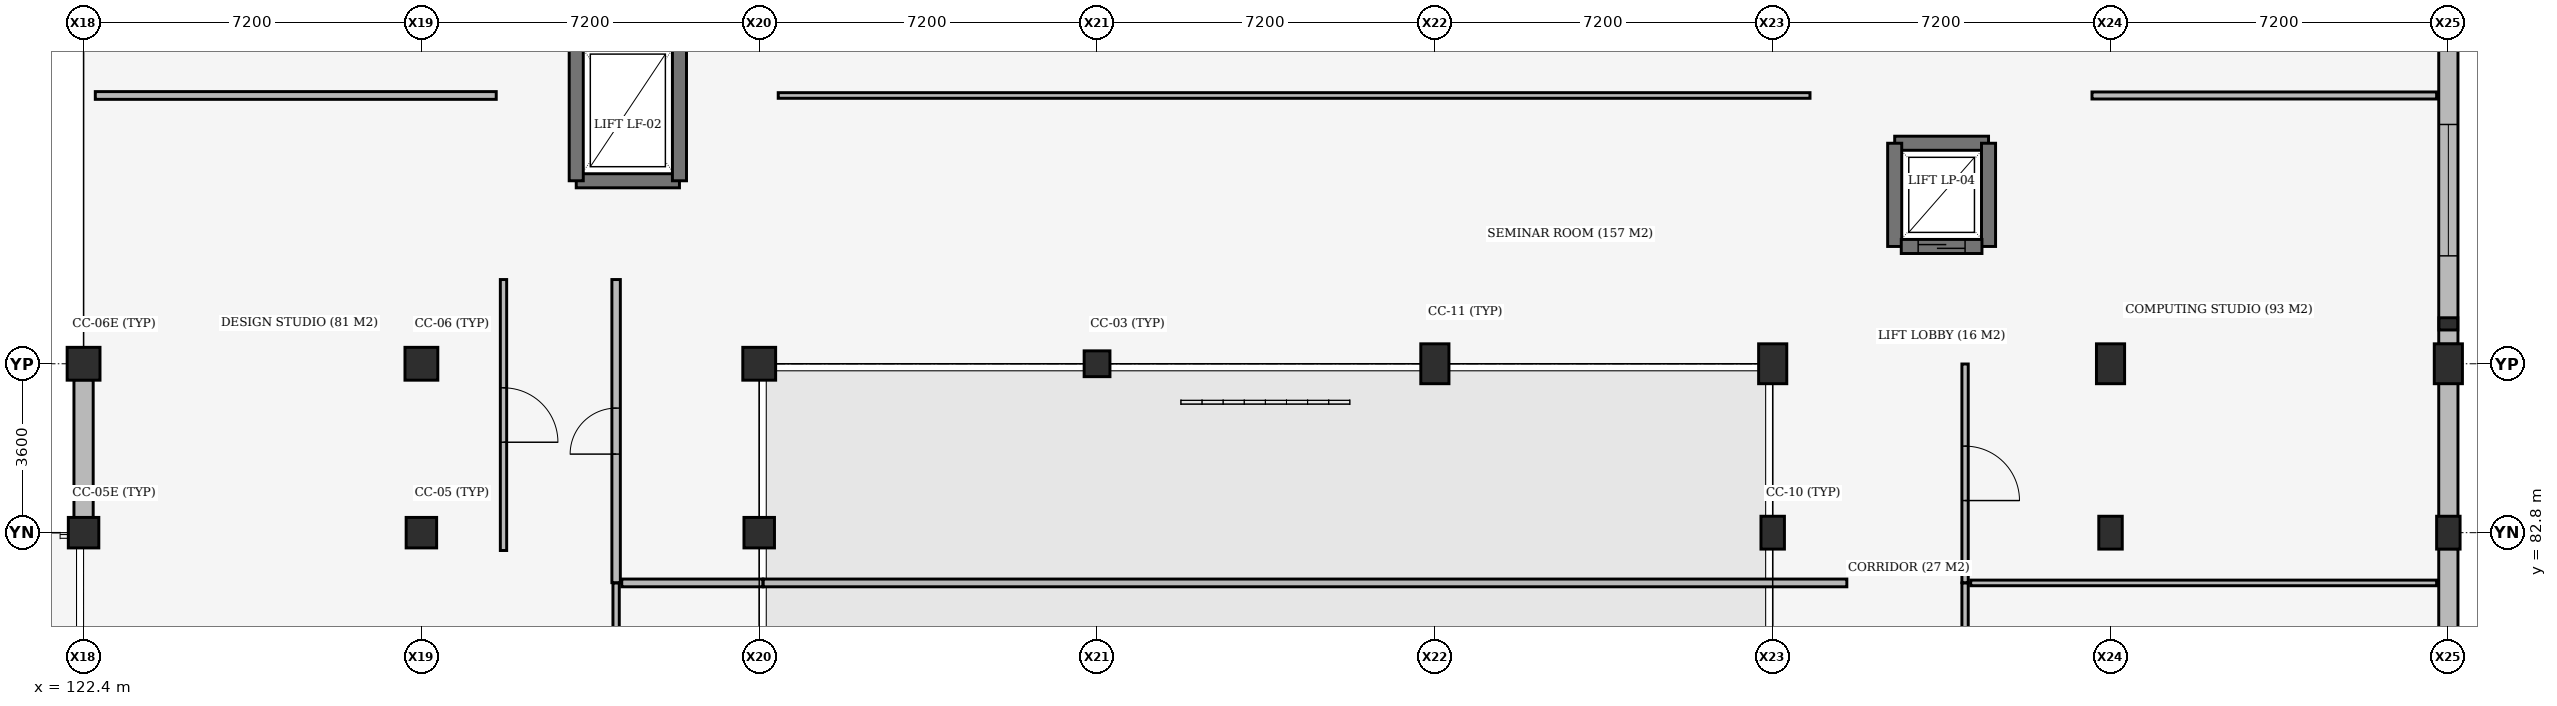
"""IFC4 building model, lengths in metres.
Left out: names, types, materials, properties, quantities, classifications, styles, units other than length and angle.
Written with IfcOpenShell. Run it as: python <this file> out.ifc"""

import sys

from ifc_helpers import new_model, si_unit, direction, frame, frame_2d, origin, origin_2d, place, context, subcontext, project, spatial, rectangle, extrude, element, fill, save


model = new_model("IFC4")
c1 = context("Model", 3, precision=1e-05, world=origin(), true_north=direction((0.0, 1.0)))
c2 = subcontext(c1, "Body", "Model", "MODEL_VIEW")
j1 = project(units=[si_unit("LENGTHUNIT", "METRE"), si_unit("PLANEANGLEUNIT", "RADIAN")], contexts=[c1])
p1 = place(None, origin())
s1 = spatial("IfcSite", under=j1, at=p1, CompositionType="ELEMENT")
p2 = place(p1, origin())
s2 = spatial("IfcBuilding", under=s1, at=p2, CompositionType="ELEMENT")
p3 = place(p2, origin())
s3 = spatial("IfcBuildingStorey", under=s2, at=p3, CompositionType="ELEMENT", Elevation=0.0)
p4 = place(p3, frame((122.4, 82.8, 0.0), z_axis=(0.0, 0.0, 1.0), x_axis=(1.0, 0.0, 0.0)))
e1 = element("IfcColumn", 1, at=p4, inside=s3, PredefinedType="COLUMN", context=c2, shape_type="SweptSolid", body=[
    extrude(rectangle(XDim=0.65, YDim=0.65, at=origin_2d()), origin(), (0.0, 0.0, 1.0), 5.1),
])
p5 = place(p3, frame((122.4, 86.4, 0.0), z_axis=(0.0, 0.0, 1.0), x_axis=(1.0, 0.0, 0.0)))
e2 = element("IfcColumn", 2, at=p5, inside=s3, PredefinedType="COLUMN", context=c2, shape_type="SweptSolid", body=[
    extrude(rectangle(XDim=0.7, YDim=0.7, at=origin_2d()), origin(), (0.0, 0.0, 1.0), 5.1),
])
p6 = place(p3, frame((129.6, 82.8, 0.0), z_axis=(0.0, 0.0, 1.0), x_axis=(1.0, 0.0, 0.0)))
e3 = element("IfcColumn", 3, at=p6, inside=s3, PredefinedType="COLUMN", context=c2, shape_type="SweptSolid", body=[
    extrude(rectangle(XDim=0.65, YDim=0.65, at=origin_2d()), origin(), (0.0, 0.0, 1.0), 5.1),
])
p7 = place(p3, frame((129.6, 86.4, 0.0), z_axis=(0.0, 0.0, 1.0), x_axis=(1.0, 0.0, 0.0)))
e4 = element("IfcColumn", 4, at=p7, inside=s3, PredefinedType="COLUMN", context=c2, shape_type="SweptSolid", body=[
    extrude(rectangle(XDim=0.7, YDim=0.7, at=origin_2d()), origin(), (0.0, 0.0, 1.0), 5.1),
])
p8 = place(p3, frame((136.8, 82.8, 0.0), z_axis=(0.0, 0.0, 1.0), x_axis=(1.0, 0.0, 0.0)))
e5 = element("IfcColumn", 5, at=p8, inside=s3, PredefinedType="COLUMN", context=c2, shape_type="SweptSolid", body=[
    extrude(rectangle(XDim=0.65, YDim=0.65, at=origin_2d()), origin(), (0.0, 0.0, 1.0), 5.1),
])
p9 = place(p3, frame((136.8, 86.4, 0.0), z_axis=(0.0, 0.0, 1.0), x_axis=(1.0, 0.0, 0.0)))
e6 = element("IfcColumn", 6, at=p9, inside=s3, PredefinedType="COLUMN", context=c2, shape_type="SweptSolid", body=[
    extrude(rectangle(XDim=0.7, YDim=0.7, at=origin_2d()), origin(), (0.0, 0.0, 1.0), 5.1),
])
p10 = place(p3, frame((144.0, 86.4, 0.0), z_axis=(0.0, 0.0, 1.0), x_axis=(1.0, 0.0, 0.0)))
e7 = element("IfcColumn", 7, at=p10, inside=s3, PredefinedType="COLUMN", context=c2, shape_type="SweptSolid", body=[
    extrude(rectangle(XDim=0.55, YDim=0.55, at=origin_2d()), origin(), (0.0, 0.0, 1.0), 5.1),
])
p11 = place(p3, frame((151.2, 86.4, 0.0), z_axis=(0.0, 0.0, 1.0), x_axis=(1.0, 0.0, 0.0)))
e8 = element("IfcColumn", 8, at=p11, inside=s3, PredefinedType="COLUMN", context=c2, shape_type="SweptSolid", body=[
    extrude(rectangle(XDim=0.6, YDim=0.85, at=origin_2d()), origin(), (0.0, 0.0, 1.0), 5.1),
])
p12 = place(p3, frame((158.4, 82.8, 0.0), z_axis=(0.0, 0.0, 1.0), x_axis=(1.0, 0.0, 0.0)))
e9 = element("IfcColumn", 9, at=p12, inside=s3, PredefinedType="COLUMN", context=c2, shape_type="SweptSolid", body=[
    extrude(rectangle(XDim=0.5, YDim=0.7, at=origin_2d()), origin(), (0.0, 0.0, 1.0), 5.1),
])
p13 = place(p3, frame((158.4, 86.4, 0.0), z_axis=(0.0, 0.0, 1.0), x_axis=(1.0, 0.0, 0.0)))
e10 = element("IfcColumn", 10, at=p13, inside=s3, PredefinedType="COLUMN", context=c2, shape_type="SweptSolid", body=[
    extrude(rectangle(XDim=0.6, YDim=0.85, at=origin_2d()), origin(), (0.0, 0.0, 1.0), 5.1),
])
p14 = place(p3, frame((165.6, 82.8, 0.0), z_axis=(0.0, 0.0, 1.0), x_axis=(1.0, 0.0, 0.0)))
e11 = element("IfcColumn", 11, at=p14, inside=s3, PredefinedType="COLUMN", context=c2, shape_type="SweptSolid", body=[
    extrude(rectangle(XDim=0.5, YDim=0.7, at=origin_2d()), origin(), (0.0, 0.0, 1.0), 5.1),
])
p15 = place(p3, frame((165.6, 86.4, 0.0), z_axis=(0.0, 0.0, 1.0), x_axis=(1.0, 0.0, 0.0)))
e12 = element("IfcColumn", 12, at=p15, inside=s3, PredefinedType="COLUMN", context=c2, shape_type="SweptSolid", body=[
    extrude(rectangle(XDim=0.6, YDim=0.85, at=origin_2d()), origin(), (0.0, 0.0, 1.0), 5.1),
])
p16 = place(p3, frame((172.8, 82.8, 0.0), z_axis=(0.0, 0.0, 1.0), x_axis=(1.0, 0.0, 0.0)))
e13 = element("IfcColumn", 13, at=p16, inside=s3, PredefinedType="COLUMN", context=c2, shape_type="SweptSolid", body=[
    extrude(rectangle(XDim=0.5, YDim=0.7, at=origin_2d()), origin(), (0.0, 0.0, 1.0), 5.1),
])
p17 = place(p3, frame((172.8, 86.4, 0.0), z_axis=(0.0, 0.0, 1.0), x_axis=(1.0, 0.0, 0.0)))
e14 = element("IfcColumn", 14, at=p17, inside=s3, PredefinedType="COLUMN", context=c2, shape_type="SweptSolid", body=[
    extrude(rectangle(XDim=0.6, YDim=0.85, at=origin_2d()), origin(), (0.0, 0.0, 1.0), 5.1),
])
p18 = place(p3, frame((172.8, 87.25, 0.0), z_axis=(0.0, 0.0, 1.0), x_axis=(1.0, 0.0, 0.0)))
e15 = element("IfcColumn", 15, at=p18, inside=s3, PredefinedType="PILASTER", context=c2, shape_type="SweptSolid", body=[
    extrude(rectangle(XDim=0.4, YDim=0.26, at=origin_2d()), origin(), (0.0, 0.0, 1.0), 5.1),
])
p19 = place(p3, frame((132.9, 90.3, 0.0), z_axis=(0.0, 0.0, 1.0), x_axis=(1.0, 0.0, 0.0)))
e16 = element("IfcWall", 16, at=p19, inside=s3, PredefinedType="SHEAR", context=c2, shape_type="SweptSolid", body=[
    extrude(rectangle(XDim=2.2, YDim=0.3, at=frame_2d((1.1, 0.0))), origin(), (0.0, 0.0, 1.0), 5.1),
])
for number, where, z_axis, x_axis in (
    (17, (132.9, 93.3, 0.0), (0.0, 0.0, 1.0), (0.0, -1.0, 0.0)),
    (18, (135.1, 90.3, 0.0), (0.0, 0.0, 1.0), (0.0, 1.0, 0.0)),
):
    element("IfcWall", number, at=place(p3, frame(where, z_axis=z_axis, x_axis=x_axis)), inside=s3, PredefinedType="SHEAR", context=c2, shape_type="SweptSolid", body=[
        extrude(rectangle(XDim=3.0, YDim=0.3, at=frame_2d((1.5, 0.0))), origin(), (0.0, 0.0, 1.0), 5.1),
    ])
p20 = place(p3, frame((163.0, 91.1, 0.0), z_axis=(0.0, 0.0, 1.0), x_axis=(-1.0, 0.0, 0.0)))
e19 = element("IfcWall", 19, at=p20, inside=s3, PredefinedType="SHEAR", context=c2, shape_type="SweptSolid", body=[
    extrude(rectangle(XDim=2.0, YDim=0.3, at=frame_2d((1.0, 0.0))), origin(), (0.0, 0.0, 1.0), 5.1),
])
for number, where, z_axis, x_axis in (
    (20, (161.0, 91.1, 0.0), (0.0, 0.0, 1.0), (0.0, -1.0, 0.0)),
    (21, (163.0, 88.9, 0.0), (0.0, 0.0, 1.0), (0.0, 1.0, 0.0)),
):
    element("IfcWall", number, at=place(p3, frame(where, z_axis=z_axis, x_axis=x_axis)), inside=s3, PredefinedType="SHEAR", context=c2, shape_type="SweptSolid", body=[
        extrude(rectangle(XDim=2.2, YDim=0.3, at=frame_2d((1.1, 0.0))), origin(), (0.0, 0.0, 1.0), 5.1),
    ])
p21 = place(p3, frame((122.4, 83.117, 0.0), z_axis=(0.0, 0.0, 1.0), x_axis=(0.0, 1.0, 0.0)))
e22 = element("IfcWall", 22, at=p21, inside=s3, PredefinedType="STANDARD", context=c2, shape_type="SweptSolid", body=[
    extrude(rectangle(XDim=2.941, YDim=0.41, at=frame_2d((1.471, 0.0))), origin(), (0.0, 0.0, 1.0), 4.4),
])
p22 = place(p3, frame((172.8, 82.458, 0.0), z_axis=(0.0, 0.0, 1.0), x_axis=(0.0, -1.0, 0.0)))
e23 = element("IfcWall", 23, at=p22, inside=s3, PredefinedType="STANDARD", context=c2, shape_type="SweptSolid", body=[
    extrude(rectangle(XDim=6.466, YDim=0.41, at=frame_2d((3.233, 0.0))), origin(), (0.0, 0.0, 1.0), 4.3),
])
p23 = place(p22, frame((1.933, 0.0, 0.85)))
e24 = element("IfcOpeningElement", 24, at=p23, cuts=e23, PredefinedType="OPENING", context=c2, shape_type="SweptSolid", body=[
    extrude(rectangle(XDim=2.6, YDim=2.4, at=frame_2d((1.3, 1.2))), frame((0.0, 0.215, 0.0), z_axis=(0.0, -1.0, 0.0), x_axis=(1.0, 0.0, 0.0)), (0.0, 0.0, 1.0), 0.43),
])
p24 = place(p3, frame((172.8, 85.983, 0.0), z_axis=(0.0, 0.0, 1.0), x_axis=(0.0, -1.0, 0.0)))
e25 = element("IfcWall", 25, at=p24, inside=s3, PredefinedType="STANDARD", context=c2, shape_type="SweptSolid", body=[
    extrude(rectangle(XDim=2.841, YDim=0.41, at=frame_2d((1.42, 0.0))), origin(), (0.0, 0.0, 1.0), 4.5),
])
p25 = place(p3, frame((172.8, 93.383, 0.0), z_axis=(0.0, 0.0, 1.0), x_axis=(0.0, -1.0, 0.0)))
e26 = element("IfcWall", 26, at=p25, inside=s3, PredefinedType="STANDARD", context=c2, shape_type="SweptSolid", body=[
    extrude(rectangle(XDim=6.566, YDim=0.41, at=frame_2d((3.283, 0.0))), origin(), (0.0, 0.0, 1.0), 4.4),
])
p26 = place(p25, frame((1.883, 0.0, 0.85)))
e27 = element("IfcOpeningElement", 27, at=p26, cuts=e26, PredefinedType="OPENING", context=c2, shape_type="SweptSolid", body=[
    extrude(rectangle(XDim=2.8, YDim=2.4, at=frame_2d((1.4, 1.2))), frame((0.0, 0.215, 0.0), z_axis=(0.0, -1.0, 0.0), x_axis=(1.0, 0.0, 0.0)), (0.0, 0.0, 1.0), 0.43),
])
p27 = place(p3, frame((162.86, 88.9, 0.0), z_axis=(0.0, 0.0, 1.0), x_axis=(-1.0, 0.0, 0.0)))
e28 = element("IfcWall", 28, at=p27, inside=s3, PredefinedType="SHEAR", context=c2, shape_type="SweptSolid", body=[
    extrude(rectangle(XDim=1.72, YDim=0.3, at=frame_2d((0.86, 0.0))), origin(), (0.0, 0.0, 1.0), 5.1),
])
p28 = place(p27, frame((0.36, 0.0, 0.0)))
e29 = element("IfcOpeningElement", 29, at=p28, cuts=e28, PredefinedType="OPENING", context=c2, shape_type="SweptSolid", body=[
    extrude(rectangle(XDim=1.0, YDim=2.1, at=frame_2d((0.5, 1.05))), frame((0.0, 0.16, 0.0), z_axis=(0.0, -1.0, 0.0), x_axis=(1.0, 0.0, 0.0)), (0.0, 0.0, 1.0), 0.32),
])
p29 = place(p3, frame((131.35, 82.42, 0.0), z_axis=(0.0, 0.0, 1.0), x_axis=(0.0, 1.0, 0.0)))
e30 = element("IfcWall", 30, at=p29, inside=s3, PredefinedType="PARTITIONING", context=c2, shape_type="SweptSolid", body=[
    extrude(rectangle(XDim=5.775, YDim=0.135, at=frame_2d((2.888, 0.0))), origin(), (0.0, 0.0, 1.0), 4.45),
])
p30 = place(p29, frame((2.308, 0.0, 0.0)))
e31 = element("IfcOpeningElement", 31, at=p30, cuts=e30, PredefinedType="OPENING", context=c2, shape_type="SweptSolid", body=[
    extrude(rectangle(XDim=1.16, YDim=2.2, at=frame_2d((0.58, 1.1))), frame((0.0, 0.077, 0.0), z_axis=(0.0, -1.0, 0.0), x_axis=(1.0, 0.0, 0.0)), (0.0, 0.0, 1.0), 0.155),
])
p31 = place(p3, frame((122.65, 92.118, 0.0), z_axis=(0.0, 0.0, 1.0), x_axis=(1.0, 0.0, 0.0)))
e32 = element("IfcWall", 32, at=p31, inside=s3, PredefinedType="PARTITIONING", context=c2, shape_type="SweptSolid", body=[
    extrude(rectangle(XDim=8.545, YDim=0.165, at=frame_2d((4.272, 0.0))), origin(), (0.0, 0.0, 1.0), 4.45),
])
p32 = place(p3, frame((133.75, 74.055, 0.0), z_axis=(0.0, 0.0, 1.0), x_axis=(0.0, 1.0, 0.0)))
e33 = element("IfcWall", 33, at=p32, inside=s3, PredefinedType="PARTITIONING", context=c2, shape_type="SweptSolid", body=[
    extrude(rectangle(XDim=7.674, YDim=0.135, at=frame_2d((3.837, 0.0))), origin(), (0.0, 0.0, 1.0), 4.4),
])
p33 = place(p32, frame((3.257, 0.0, 0.0)))
e34 = element("IfcOpeningElement", 34, at=p33, cuts=e33, PredefinedType="OPENING", context=c2, shape_type="SweptSolid", body=[
    extrude(rectangle(XDim=1.16, YDim=2.2, at=frame_2d((0.58, 1.1))), frame((0.0, 0.077, 0.0), z_axis=(0.0, -1.0, 0.0), x_axis=(1.0, 0.0, 0.0)), (0.0, 0.0, 1.0), 0.155),
])
p34 = place(p3, frame((133.87, 81.729, 0.0), z_axis=(0.0, 0.0, 1.0), x_axis=(1.0, 0.0, 0.0)))
e35 = element("IfcWall", 35, at=p34, inside=s3, PredefinedType="PARTITIONING", context=c2, shape_type="SweptSolid", body=[
    extrude(rectangle(XDim=3.01, YDim=0.165, at=frame_2d((1.505, 0.0))), origin(), (0.0, 0.0, 1.0), 4.35),
])
p35 = place(p3, frame((133.75, 81.734, 0.0), z_axis=(0.0, 0.0, 1.0), x_axis=(0.0, 1.0, 0.0)))
e36 = element("IfcWall", 36, at=p35, inside=s3, PredefinedType="PARTITIONING", context=c2, shape_type="SweptSolid", body=[
    extrude(rectangle(XDim=6.461, YDim=0.18, at=frame_2d((3.23, 0.0))), origin(), (0.0, 0.0, 1.0), 4.45),
])
p36 = place(p35, frame((2.74, 0.0, 0.0)))
e37 = element("IfcOpeningElement", 37, at=p36, cuts=e36, PredefinedType="OPENING", context=c2, shape_type="SweptSolid", body=[
    extrude(rectangle(XDim=0.98, YDim=2.18, at=frame_2d((0.49, 1.09))), frame((0.0, 0.1, 0.0), z_axis=(0.0, -1.0, 0.0), x_axis=(1.0, 0.0, 0.0)), (0.0, 0.0, 1.0), 0.2),
])
p37 = place(p3, frame((136.885, 81.729, 0.0), z_axis=(0.0, 0.0, 1.0), x_axis=(1.0, 0.0, 0.0)))
e38 = element("IfcWall", 38, at=p37, inside=s3, PredefinedType="PARTITIONING", context=c2, shape_type="SweptSolid", body=[
    extrude(rectangle(XDim=23.095, YDim=0.165, at=frame_2d((11.547, 0.0))), origin(), (0.0, 0.0, 1.0), 4.35),
])
p38 = place(p3, frame((137.205, 92.118, 0.0), z_axis=(0.0, 0.0, 1.0), x_axis=(1.0, 0.0, 0.0)))
e39 = element("IfcWall", 39, at=p38, inside=s3, PredefinedType="PARTITIONING", context=c2, shape_type="SweptSolid", body=[
    extrude(rectangle(XDim=21.99, YDim=0.12, at=frame_2d((10.995, 0.0))), origin(), (0.0, 0.0, 1.0), 4.3),
])
p39 = place(p3, frame((162.5, 74.055, 0.0), z_axis=(0.0, 0.0, 1.0), x_axis=(0.0, 1.0, 0.0)))
e40 = element("IfcWall", 40, at=p39, inside=s3, PredefinedType="PARTITIONING", context=c2, shape_type="SweptSolid", body=[
    extrude(rectangle(XDim=7.674, YDim=0.135, at=frame_2d((3.837, 0.0))), origin(), (0.0, 0.0, 1.0), 4.35),
])
p40 = place(p39, frame((3.262, 0.0, 0.0)))
e41 = element("IfcOpeningElement", 41, at=p40, cuts=e40, PredefinedType="OPENING", context=c2, shape_type="SweptSolid", body=[
    extrude(rectangle(XDim=1.15, YDim=2.2, at=frame_2d((0.575, 1.1))), frame((0.0, 0.077, 0.0), z_axis=(0.0, -1.0, 0.0), x_axis=(1.0, 0.0, 0.0)), (0.0, 0.0, 1.0), 0.155),
])
p41 = place(p3, frame((162.62, 81.729, 0.0), z_axis=(0.0, 0.0, 1.0), x_axis=(1.0, 0.0, 0.0)))
e42 = element("IfcWall", 42, at=p41, inside=s3, PredefinedType="PARTITIONING", context=c2, shape_type="SweptSolid", body=[
    extrude(rectangle(XDim=9.93, YDim=0.12, at=frame_2d((4.965, 0.0))), origin(), (0.0, 0.0, 1.0), 4.5),
])
p42 = place(p3, frame((162.5, 81.734, 0.0), z_axis=(0.0, 0.0, 1.0), x_axis=(0.0, 1.0, 0.0)))
e43 = element("IfcWall", 43, at=p42, inside=s3, PredefinedType="PARTITIONING", context=c2, shape_type="SweptSolid", body=[
    extrude(rectangle(XDim=4.661, YDim=0.135, at=frame_2d((2.331, 0.0))), origin(), (0.0, 0.0, 1.0), 4.3),
])
p43 = place(p42, frame((1.75, 0.0, 0.0)))
e44 = element("IfcOpeningElement", 44, at=p43, cuts=e43, PredefinedType="OPENING", context=c2, shape_type="SweptSolid", body=[
    extrude(rectangle(XDim=1.16, YDim=2.2, at=frame_2d((0.58, 1.1))), frame((0.0, 0.077, 0.0), z_axis=(0.0, -1.0, 0.0), x_axis=(1.0, 0.0, 0.0)), (0.0, 0.0, 1.0), 0.155),
])
p44 = place(p3, frame((165.205, 92.118, 0.0), z_axis=(0.0, 0.0, 1.0), x_axis=(1.0, 0.0, 0.0)))
e45 = element("IfcWall", 45, at=p44, inside=s3, PredefinedType="PARTITIONING", context=c2, shape_type="SweptSolid", body=[
    extrude(rectangle(XDim=7.345, YDim=0.15, at=frame_2d((3.672, 0.0))), origin(), (0.0, 0.0, 1.0), 4.4),
])
p45 = place(p26, origin())
e46 = element("IfcWindow", 46, at=p45, inside=s3, PartitioningType="DOUBLE_PANEL_VERTICAL", PredefinedType="WINDOW", context=c2, shape_type="SweptSolid", body=[
    extrude(rectangle(XDim=2.8, YDim=2.4, at=frame_2d((1.4, 1.2))), frame((0.0, 0.03, 0.0), z_axis=(0.0, -1.0, 0.0), x_axis=(1.0, 0.0, 0.0)), (0.0, 0.0, 1.0), 0.06),
])
fill(e27, e46)
p46 = place(p28, origin())
e47 = element("IfcDoor", 47, at=p46, inside=s3, OperationType="SLIDING_TO_LEFT", PredefinedType="DOOR", context=c2, shape_type="SweptSolid", body=[
    extrude(rectangle(XDim=1.0, YDim=2.1, at=frame_2d((0.5, 1.05))), frame((0.0, 0.025, 0.0), z_axis=(0.0, -1.0, 0.0), x_axis=(1.0, 0.0, 0.0)), (0.0, 0.0, 1.0), 0.05),
])
fill(e29, e47)
p47 = place(p30, origin())
e48 = element("IfcDoor", 48, at=p47, inside=s3, OperationType="SINGLE_SWING_RIGHT", PredefinedType="DOOR", context=c2, shape_type="SweptSolid", body=[
    extrude(rectangle(XDim=1.16, YDim=2.2, at=frame_2d((0.58, 1.1))), frame((0.0, 0.025, 0.0), z_axis=(0.0, -1.0, 0.0), x_axis=(1.0, 0.0, 0.0)), (0.0, 0.0, 1.0), 0.05),
])
fill(e31, e48)
p48 = place(p36, origin())
e49 = element("IfcDoor", 49, at=p48, inside=s3, OperationType="SINGLE_SWING_LEFT", PredefinedType="DOOR", context=c2, shape_type="SweptSolid", body=[
    extrude(rectangle(XDim=0.98, YDim=2.18, at=frame_2d((0.49, 1.09))), frame((0.0, 0.025, 0.0), z_axis=(0.0, -1.0, 0.0), x_axis=(1.0, 0.0, 0.0)), (0.0, 0.0, 1.0), 0.05),
])
fill(e37, e49)
p49 = place(p43, origin())
e50 = element("IfcDoor", 50, at=p49, inside=s3, OperationType="SINGLE_SWING_RIGHT", PredefinedType="DOOR", context=c2, shape_type="SweptSolid", body=[
    extrude(rectangle(XDim=1.16, YDim=2.2, at=frame_2d((0.58, 1.1))), frame((0.0, 0.025, 0.0), z_axis=(0.0, -1.0, 0.0), x_axis=(1.0, 0.0, 0.0)), (0.0, 0.0, 1.0), 0.05),
])
fill(e44, e50)
save(model, sys.argv[1])
